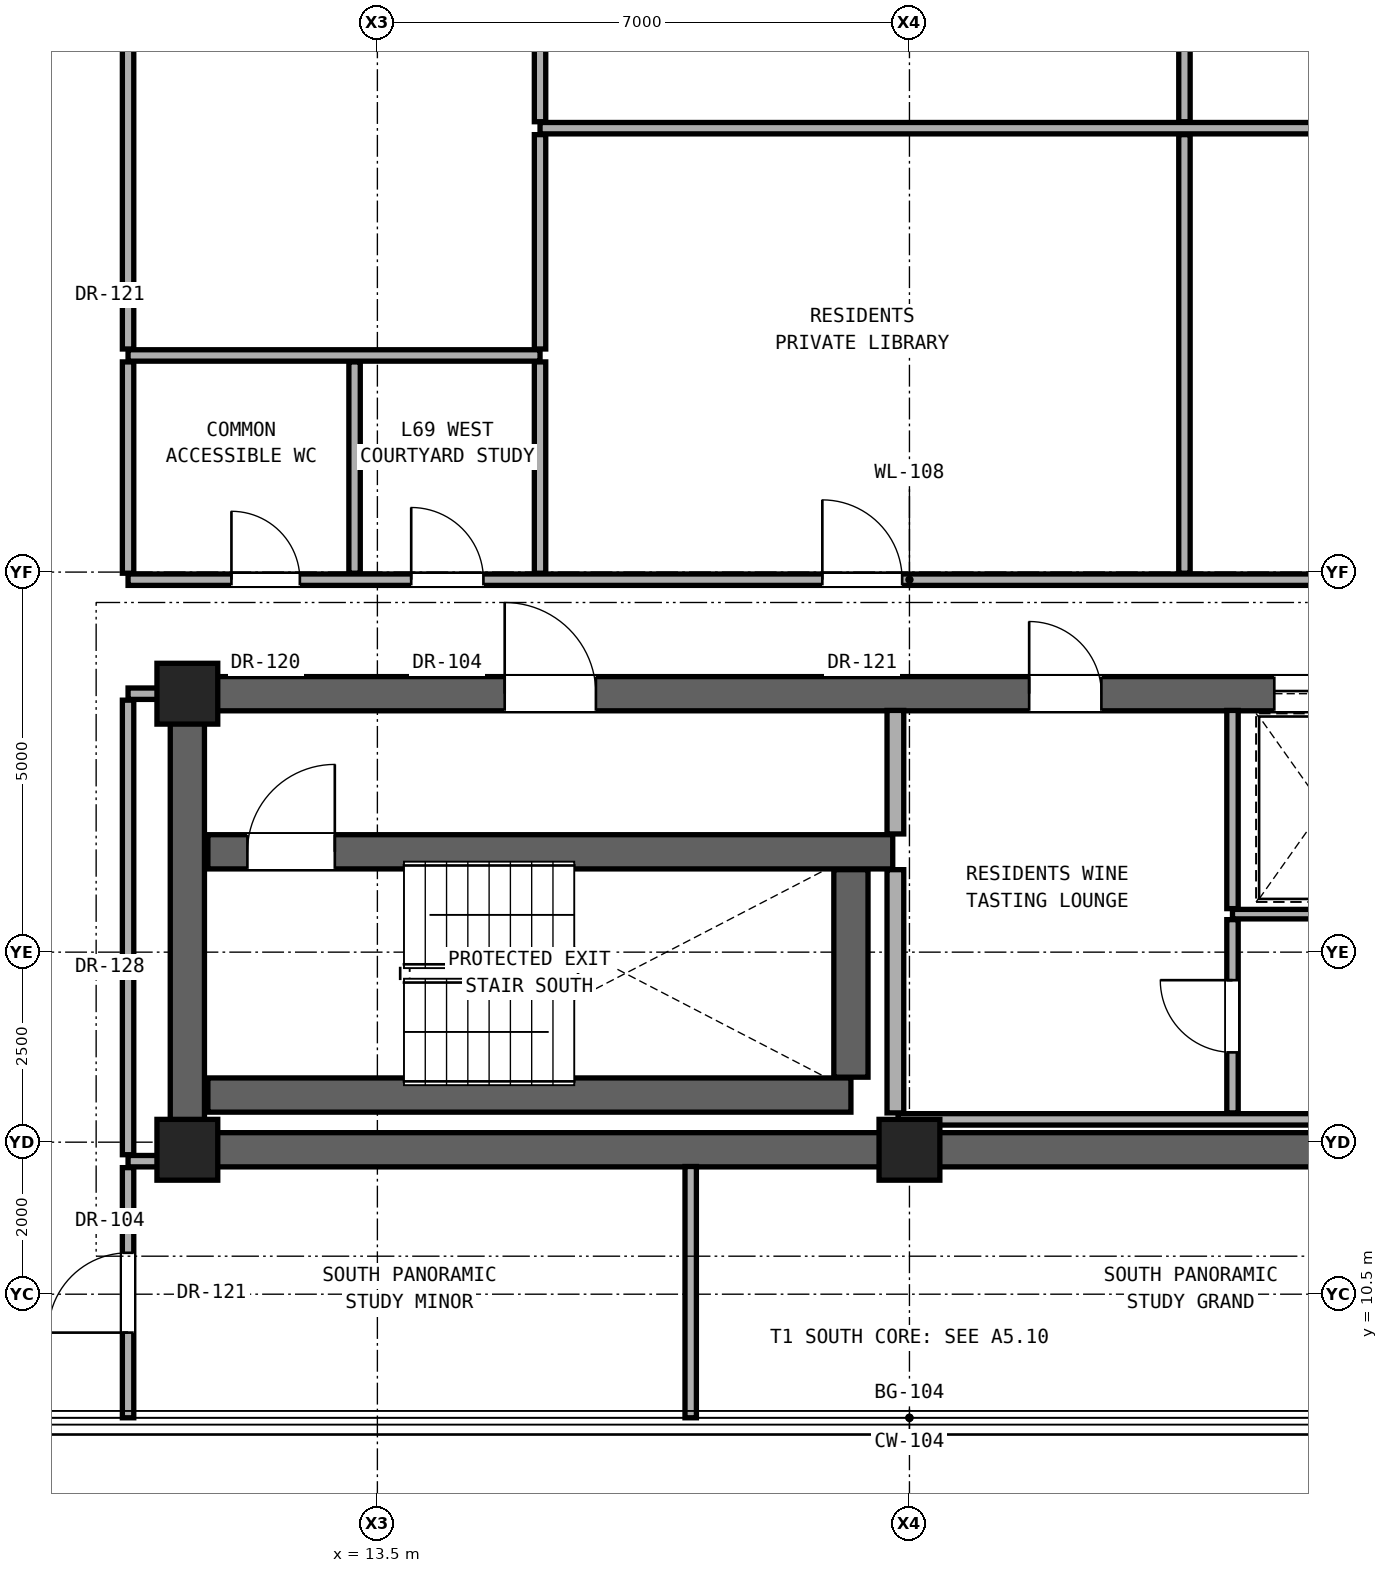
"""IFC4 building model, lengths in metres.
Left out: names, types, materials, properties, quantities, classifications, styles, units other than length and angle.
Written with IfcOpenShell. Run it as: python <this file> out.ifc"""

import sys

from ifc_helpers import new_model, si_unit, direction, frame, frame_2d, origin, origin_2d, place, context, subcontext, project, spatial, rectangle, extrude, element, fill, save


model = new_model("IFC4")
c1 = context("Model", 3, precision=1e-05, world=origin(), true_north=direction((0.0, 1.0)))
c2 = subcontext(c1, "Body", "Model", "MODEL_VIEW")
j1 = project(units=[si_unit("LENGTHUNIT", "METRE"), si_unit("PLANEANGLEUNIT", "RADIAN")], contexts=[c1])
p1 = place(None, origin())
s1 = spatial("IfcSite", under=j1, at=p1, CompositionType="ELEMENT")
p2 = place(p1, origin())
s2 = spatial("IfcBuilding", under=s1, at=p2, CompositionType="ELEMENT")
p3 = place(p2, frame((0.0, 0.0, 242.5)))
s3 = spatial("IfcBuildingStorey", under=s2, at=p3, CompositionType="ELEMENT", Elevation=242.5)
for number, where, z_axis, x_axis in (
    (1, (11.0, 12.4, 0.0), (0.0, 0.0, 1.0), (1.0, 0.0, 0.0)),
    (2, (20.5, 12.4, 0.0), (0.0, 0.0, 1.0), (1.0, 0.0, 0.0)),
    (3, (11.0, 18.4, 0.0), (0.0, 0.0, 1.0), (1.0, 0.0, 0.0)),
):
    element("IfcColumn", number, at=place(p3, frame(where, z_axis=z_axis, x_axis=x_axis)), inside=s3, PredefinedType="COLUMN", context=c2, shape_type="SweptSolid", body=[
        extrude(rectangle(XDim=0.8, YDim=0.8, at=origin_2d()), origin(), (0.0, 0.0, 1.0), 3.3),
    ])
p4 = place(p3, frame((11.0, 12.4, 0.0), z_axis=(0.0, 0.0, 1.0), x_axis=(1.0, 0.0, 0.0)))
e4 = element("IfcWall", 4, at=p4, inside=s3, PredefinedType="SHEAR", context=c2, shape_type="SweptSolid", body=[
    extrude(rectangle(XDim=19.0, YDim=0.45, at=frame_2d((9.5, 0.0))), origin(), (0.0, 0.0, 1.0), 3.1),
])
p5 = place(p3, frame((11.0, 12.4, 0.0), z_axis=(0.0, 0.0, 1.0), x_axis=(0.0, 1.0, 0.0)))
e5 = element("IfcWall", 5, at=p5, inside=s3, PredefinedType="SHEAR", context=c2, shape_type="SweptSolid", body=[
    extrude(rectangle(XDim=6.0, YDim=0.45, at=frame_2d((3.0, 0.0))), origin(), (0.0, 0.0, 1.0), 3.1),
])
p6 = place(p3, frame((11.0, 18.4, 0.0), z_axis=(0.0, 0.0, 1.0), x_axis=(1.0, 0.0, 0.0)))
e6 = element("IfcWall", 6, at=p6, inside=s3, PredefinedType="SHEAR", context=c2, shape_type="SweptSolid", body=[
    extrude(rectangle(XDim=19.0, YDim=0.45, at=frame_2d((9.5, 0.0))), origin(), (0.0, 0.0, 1.0), 3.1),
])
p7 = place(p6, frame((4.175, 0.0, 0.0)))
e7 = element("IfcOpeningElement", 7, at=p7, cuts=e6, PredefinedType="OPENING", context=c2, shape_type="SweptSolid", body=[
    extrude(rectangle(XDim=1.2, YDim=2.25, at=frame_2d((0.6, 1.125))), frame((0.0, 0.235, 0.0), z_axis=(0.0, -1.0, 0.0), x_axis=(1.0, 0.0, 0.0)), (0.0, 0.0, 1.0), 0.47),
])
p8 = place(p6, frame((11.075, 0.0, 0.0)))
e8 = element("IfcOpeningElement", 8, at=p8, cuts=e6, PredefinedType="OPENING", context=c2, shape_type="SweptSolid", body=[
    extrude(rectangle(XDim=0.95, YDim=2.15, at=frame_2d((0.475, 1.075))), frame((0.0, 0.235, 0.0), z_axis=(0.0, -1.0, 0.0), x_axis=(1.0, 0.0, 0.0)), (0.0, 0.0, 1.0), 0.47),
])
p9 = place(p6, frame((14.3, 0.0, 0.0)))
e9 = element("IfcOpeningElement", 9, at=p9, cuts=e6, PredefinedType="OPENING", context=c2, shape_type="SweptSolid", body=[
    extrude(rectangle(XDim=1.3, YDim=2.3, at=frame_2d((0.65, 1.15))), frame((0.0, 0.235, 0.0), z_axis=(0.0, -1.0, 0.0), x_axis=(1.0, 0.0, 0.0)), (0.0, 0.0, 1.0), 0.47),
])
p10 = place(p6, frame((16.6, 0.0, 0.0)))
e10 = element("IfcOpeningElement", 10, at=p10, cuts=e6, PredefinedType="OPENING", context=c2, shape_type="SweptSolid", body=[
    extrude(rectangle(XDim=1.3, YDim=2.3, at=frame_2d((0.65, 1.15))), frame((0.0, 0.235, 0.0), z_axis=(0.0, -1.0, 0.0), x_axis=(1.0, 0.0, 0.0)), (0.0, 0.0, 1.0), 0.47),
])
p11 = place(p3, frame((10.22, 12.25, 0.0), z_axis=(0.0, 0.0, 1.0), x_axis=(1.0, 0.0, 0.0)))
e11 = element("IfcWall", 11, at=p11, inside=s3, PredefinedType="PARTITIONING", context=c2, shape_type="SweptSolid", body=[
    extrude(rectangle(XDim=0.56, YDim=0.15, at=frame_2d((0.28, 0.0))), origin(), (0.0, 0.0, 1.0), 3.1),
])
p12 = place(p3, frame((20.35, 12.8, 0.0), z_axis=(0.0, 0.0, 1.0), x_axis=(1.0, 0.0, 0.0)))
e12 = element("IfcWall", 12, at=p12, inside=s3, PredefinedType="PARTITIONING", context=c2, shape_type="SweptSolid", body=[
    extrude(rectangle(XDim=8.9, YDim=0.15, at=frame_2d((4.45, 0.0))), origin(), (0.0, 0.0, 1.0), 3.1),
])
p13 = place(p3, frame((11.27, 13.12, 0.0), z_axis=(0.0, 0.0, 1.0), x_axis=(1.0, 0.0, 0.0)))
e13 = element("IfcWall", 13, at=p13, inside=s3, PredefinedType="SHEAR", context=c2, shape_type="SweptSolid", body=[
    extrude(rectangle(XDim=8.46, YDim=0.45, at=frame_2d((4.23, 0.0))), origin(), (0.0, 0.0, 1.0), 3.1),
])
p14 = place(p3, frame((24.75, 15.5, 0.0), z_axis=(0.0, 0.0, 1.0), x_axis=(1.0, 0.0, 0.0)))
e14 = element("IfcWall", 14, at=p14, inside=s3, PredefinedType="PARTITIONING", context=c2, shape_type="SweptSolid", body=[
    extrude(rectangle(XDim=4.5, YDim=0.125, at=frame_2d((2.25, 0.0))), origin(), (0.0, 0.0, 1.0), 3.1),
])
p15 = place(p3, frame((11.27, 16.32, 0.0), z_axis=(0.0, 0.0, 1.0), x_axis=(1.0, 0.0, 0.0)))
e15 = element("IfcWall", 15, at=p15, inside=s3, PredefinedType="SHEAR", context=c2, shape_type="SweptSolid", body=[
    extrude(rectangle(XDim=9.01, YDim=0.45, at=frame_2d((4.505, 0.0))), origin(), (0.0, 0.0, 1.0), 3.1),
])
p16 = place(p15, frame((0.52, 0.0, 0.0)))
e16 = element("IfcOpeningElement", 16, at=p16, cuts=e15, PredefinedType="OPENING", context=c2, shape_type="SweptSolid", body=[
    extrude(rectangle(XDim=1.15, YDim=2.2, at=frame_2d((0.575, 1.1))), frame((0.0, 0.235, 0.0), z_axis=(0.0, -1.0, 0.0), x_axis=(1.0, 0.0, 0.0)), (0.0, 0.0, 1.0), 0.47),
])
p17 = place(p3, frame((10.22, 18.4, 0.0), z_axis=(0.0, 0.0, 1.0), x_axis=(1.0, 0.0, 0.0)))
e17 = element("IfcWall", 17, at=p17, inside=s3, PredefinedType="PARTITIONING", context=c2, shape_type="SweptSolid", body=[
    extrude(rectangle(XDim=0.56, YDim=0.15, at=frame_2d((0.28, 0.0))), origin(), (0.0, 0.0, 1.0), 2.492),
])
p18 = place(p3, frame((10.22, 19.9, 0.0), z_axis=(0.0, 0.0, 1.0), x_axis=(1.0, 0.0, 0.0)))
e18 = element("IfcWall", 18, at=p18, inside=s3, PredefinedType="PARTITIONING", context=c2, shape_type="SweptSolid", body=[
    extrude(rectangle(XDim=20.56, YDim=0.15, at=frame_2d((10.28, 0.0))), origin(), (0.0, 0.0, 1.0), 2.236),
])
p19 = place(p18, frame((1.36, 0.0, 0.0)))
e19 = element("IfcOpeningElement", 19, at=p19, cuts=e18, PredefinedType="OPENING", context=c2, shape_type="SweptSolid", body=[
    extrude(rectangle(XDim=0.9, YDim=2.1, at=frame_2d((0.45, 1.05))), frame((0.0, 0.085, 0.0), z_axis=(0.0, -1.0, 0.0), x_axis=(1.0, 0.0, 0.0)), (0.0, 0.0, 1.0), 0.17),
])
p20 = place(p18, frame((3.725, 0.0, 0.0)))
e20 = element("IfcOpeningElement", 20, at=p20, cuts=e18, PredefinedType="OPENING", context=c2, shape_type="SweptSolid", body=[
    extrude(rectangle(XDim=0.95, YDim=2.15, at=frame_2d((0.475, 1.075))), frame((0.0, 0.085, 0.0), z_axis=(0.0, -1.0, 0.0), x_axis=(1.0, 0.0, 0.0)), (0.0, 0.0, 1.0), 0.17),
])
p21 = place(p18, frame((9.134, 0.0, 0.0)))
e21 = element("IfcOpeningElement", 21, at=p21, cuts=e18, PredefinedType="OPENING", context=c2, shape_type="SweptSolid", body=[
    extrude(rectangle(XDim=1.05, YDim=2.2, at=frame_2d((0.525, 1.1))), frame((0.0, 0.085, 0.0), z_axis=(0.0, -1.0, 0.0), x_axis=(1.0, 0.0, 0.0)), (0.0, 0.0, 1.0), 0.17),
])
p22 = place(p18, frame((16.684, 0.0, 0.0)))
e22 = element("IfcOpeningElement", 22, at=p22, cuts=e18, PredefinedType="OPENING", context=c2, shape_type="SweptSolid", body=[
    extrude(rectangle(XDim=1.05, YDim=2.2, at=frame_2d((0.525, 1.1))), frame((0.0, 0.085, 0.0), z_axis=(0.0, -1.0, 0.0), x_axis=(1.0, 0.0, 0.0)), (0.0, 0.0, 1.0), 0.17),
])
p23 = place(p3, frame((10.22, 22.85, 0.0), z_axis=(0.0, 0.0, 1.0), x_axis=(1.0, 0.0, 0.0)))
e23 = element("IfcWall", 23, at=p23, inside=s3, PredefinedType="PARTITIONING", context=c2, shape_type="SweptSolid", body=[
    extrude(rectangle(XDim=5.42, YDim=0.15, at=frame_2d((2.71, 0.0))), origin(), (0.0, 0.0, 1.0), 2.236),
])
p24 = place(p3, frame((15.64, 25.84, 0.0), z_axis=(0.0, 0.0, 1.0), x_axis=(1.0, 0.0, 0.0)))
e24 = element("IfcWall", 24, at=p24, inside=s3, PredefinedType="PARTITIONING", context=c2, shape_type="SweptSolid", body=[
    extrude(rectangle(XDim=15.14, YDim=0.15, at=frame_2d((7.57, 0.0))), origin(), (0.0, 0.0, 1.0), 2.236),
])
p25 = place(p3, frame((10.22, 8.874, 0.0), z_axis=(0.0, 0.0, 1.0), x_axis=(0.0, 1.0, 0.0)))
e25 = element("IfcWall", 25, at=p25, inside=s3, PredefinedType="PARTITIONING", context=c2, shape_type="SweptSolid", body=[
    extrude(rectangle(XDim=3.291, YDim=0.15, at=frame_2d((1.646, 0.0))), origin(), (0.0, 0.0, 1.0), 3.1),
])
p26 = place(p25, frame((1.121, 0.0, 0.0)))
e26 = element("IfcOpeningElement", 26, at=p26, cuts=e25, PredefinedType="OPENING", context=c2, shape_type="SweptSolid", body=[
    extrude(rectangle(XDim=1.05, YDim=2.2, at=frame_2d((0.525, 1.1))), frame((0.0, 0.085, 0.0), z_axis=(0.0, -1.0, 0.0), x_axis=(1.0, 0.0, 0.0)), (0.0, 0.0, 1.0), 0.17),
])
p27 = place(p3, frame((10.22, 12.335, 0.0), z_axis=(0.0, 0.0, 1.0), x_axis=(0.0, 1.0, 0.0)))
e27 = element("IfcWall", 27, at=p27, inside=s3, PredefinedType="PARTITIONING", context=c2, shape_type="SweptSolid", body=[
    extrude(rectangle(XDim=5.98, YDim=0.15, at=frame_2d((2.99, 0.0))), origin(), (0.0, 0.0, 1.0), 2.492),
])
p28 = place(p3, frame((10.22, 19.985, 0.0), z_axis=(0.0, 0.0, 1.0), x_axis=(0.0, 1.0, 0.0)))
e28 = element("IfcWall", 28, at=p28, inside=s3, PredefinedType="PARTITIONING", context=c2, shape_type="SweptSolid", body=[
    extrude(rectangle(XDim=2.78, YDim=0.15, at=frame_2d((1.39, 0.0))), origin(), (0.0, 0.0, 1.0), 3.1),
])
p29 = place(p3, frame((10.22, 22.935, 0.0), z_axis=(0.0, 0.0, 1.0), x_axis=(0.0, 1.0, 0.0)))
e29 = element("IfcWall", 29, at=p29, inside=s3, PredefinedType="PARTITIONING", context=c2, shape_type="SweptSolid", body=[
    extrude(rectangle(XDim=10.08, YDim=0.15, at=frame_2d((5.04, 0.0))), origin(), (0.0, 0.0, 1.0), 2.396),
])
p30 = place(p29, frame((4.565, 0.0, 0.0)))
e30 = element("IfcOpeningElement", 30, at=p30, cuts=e29, PredefinedType="OPENING", context=c2, shape_type="SweptSolid", body=[
    extrude(rectangle(XDim=0.95, YDim=2.15, at=frame_2d((0.475, 1.075))), frame((0.0, 0.085, 0.0), z_axis=(0.0, -1.0, 0.0), x_axis=(1.0, 0.0, 0.0)), (0.0, 0.0, 1.0), 0.17),
])
p31 = place(p3, frame((13.2, 19.985, 0.0), z_axis=(0.0, 0.0, 1.0), x_axis=(0.0, 1.0, 0.0)))
e31 = element("IfcWall", 31, at=p31, inside=s3, PredefinedType="PARTITIONING", context=c2, shape_type="SweptSolid", body=[
    extrude(rectangle(XDim=2.78, YDim=0.15, at=frame_2d((1.39, 0.0))), origin(), (0.0, 0.0, 1.0), 3.1),
])
p32 = place(p3, frame((15.64, 19.985, 0.0), z_axis=(0.0, 0.0, 1.0), x_axis=(0.0, 1.0, 0.0)))
e32 = element("IfcWall", 32, at=p32, inside=s3, PredefinedType="PARTITIONING", context=c2, shape_type="SweptSolid", body=[
    extrude(rectangle(XDim=2.78, YDim=0.15, at=frame_2d((1.39, 0.0))), origin(), (0.0, 0.0, 1.0), 2.675),
])
p33 = place(p3, frame((15.64, 22.935, 0.0), z_axis=(0.0, 0.0, 1.0), x_axis=(0.0, 1.0, 0.0)))
e33 = element("IfcWall", 33, at=p33, inside=s3, PredefinedType="PARTITIONING", context=c2, shape_type="SweptSolid", body=[
    extrude(rectangle(XDim=2.82, YDim=0.15, at=frame_2d((1.41, 0.0))), origin(), (0.0, 0.0, 1.0), 2.236),
])
p34 = place(p3, frame((15.64, 25.925, 0.0), z_axis=(0.0, 0.0, 1.0), x_axis=(0.0, 1.0, 0.0)))
e34 = element("IfcWall", 34, at=p34, inside=s3, PredefinedType="PARTITIONING", context=c2, shape_type="SweptSolid", body=[
    extrude(rectangle(XDim=7.09, YDim=0.15, at=frame_2d((3.545, 0.0))), origin(), (0.0, 0.0, 1.0), 2.236),
])
p35 = place(p3, frame((17.622, 8.874, 0.0), z_axis=(0.0, 0.0, 1.0), x_axis=(0.0, 1.0, 0.0)))
e35 = element("IfcWall", 35, at=p35, inside=s3, PredefinedType="PARTITIONING", context=c2, shape_type="SweptSolid", body=[
    extrude(rectangle(XDim=3.306, YDim=0.15, at=frame_2d((1.653, 0.0))), origin(), (0.0, 0.0, 1.0), 3.1),
])
p36 = place(p3, frame((19.73, 13.355, 0.0), z_axis=(0.0, 0.0, 1.0), x_axis=(0.0, 1.0, 0.0)))
e36 = element("IfcWall", 36, at=p36, inside=s3, PredefinedType="SHEAR", context=c2, shape_type="SweptSolid", body=[
    extrude(rectangle(XDim=2.73, YDim=0.45, at=frame_2d((1.365, 0.0))), origin(), (0.0, 0.0, 1.0), 3.1),
])
p37 = place(p3, frame((20.315, 12.885, 0.0), z_axis=(0.0, 0.0, 1.0), x_axis=(0.0, 1.0, 0.0)))
e37 = element("IfcWall", 37, at=p37, inside=s3, PredefinedType="SOLIDWALL", context=c2, shape_type="SweptSolid", body=[
    extrude(rectangle(XDim=3.2, YDim=0.22, at=frame_2d((1.6, 0.0))), origin(), (0.0, 0.0, 1.0), 3.1),
])
p38 = place(p3, frame((20.315, 16.555, 0.0), z_axis=(0.0, 0.0, 1.0), x_axis=(0.0, 1.0, 0.0)))
e38 = element("IfcWall", 38, at=p38, inside=s3, PredefinedType="SOLIDWALL", context=c2, shape_type="SweptSolid", body=[
    extrude(rectangle(XDim=1.625, YDim=0.22, at=frame_2d((0.812, 0.0))), origin(), (0.0, 0.0, 1.0), 3.1),
])
p39 = place(p3, frame((24.118, 19.985, 0.0), z_axis=(0.0, 0.0, 1.0), x_axis=(0.0, 1.0, 0.0)))
e39 = element("IfcWall", 39, at=p39, inside=s3, PredefinedType="PARTITIONING", context=c2, shape_type="SweptSolid", body=[
    extrude(rectangle(XDim=5.77, YDim=0.15, at=frame_2d((2.885, 0.0))), origin(), (0.0, 0.0, 1.0), 2.236),
])
p40 = place(p3, frame((24.118, 25.925, 0.0), z_axis=(0.0, 0.0, 1.0), x_axis=(0.0, 1.0, 0.0)))
e40 = element("IfcWall", 40, at=p40, inside=s3, PredefinedType="PARTITIONING", context=c2, shape_type="SweptSolid", body=[
    extrude(rectangle(XDim=7.09, YDim=0.15, at=frame_2d((3.545, 0.0))), origin(), (0.0, 0.0, 1.0), 2.236),
])
p41 = place(p3, frame((24.75, 12.885, 0.0), z_axis=(0.0, 0.0, 1.0), x_axis=(0.0, 1.0, 0.0)))
e41 = element("IfcWall", 41, at=p41, inside=s3, PredefinedType="PARTITIONING", context=c2, shape_type="SweptSolid", body=[
    extrude(rectangle(XDim=2.542, YDim=0.15, at=frame_2d((1.271, 0.0))), origin(), (0.0, 0.0, 1.0), 3.1),
])
p42 = place(p41, frame((0.796, 0.0, 0.0)))
e42 = element("IfcOpeningElement", 42, at=p42, cuts=e41, PredefinedType="OPENING", context=c2, shape_type="SweptSolid", body=[
    extrude(rectangle(XDim=0.95, YDim=2.15, at=frame_2d((0.475, 1.075))), frame((0.0, 0.085, 0.0), z_axis=(0.0, -1.0, 0.0), x_axis=(1.0, 0.0, 0.0)), (0.0, 0.0, 1.0), 0.17),
])
p43 = place(p3, frame((24.75, 15.573, 0.0), z_axis=(0.0, 0.0, 1.0), x_axis=(0.0, 1.0, 0.0)))
e43 = element("IfcWall", 43, at=p43, inside=s3, PredefinedType="PARTITIONING", context=c2, shape_type="SweptSolid", body=[
    extrude(rectangle(XDim=2.607, YDim=0.15, at=frame_2d((1.304, 0.0))), origin(), (0.0, 0.0, 1.0), 3.1),
])
p44 = place(p7, origin())
e44 = element("IfcDoor", 44, at=p44, inside=s3, OperationType="SINGLE_SWING_LEFT", PredefinedType="DOOR", context=c2, shape_type="SweptSolid", body=[
    extrude(rectangle(XDim=1.2, YDim=2.25, at=frame_2d((0.6, 1.125))), frame((0.0, 0.025, 0.0), z_axis=(0.0, -1.0, 0.0), x_axis=(1.0, 0.0, 0.0)), (0.0, 0.0, 1.0), 0.05),
])
fill(e7, e44)
p45 = place(p16, origin())
e45 = element("IfcDoor", 45, at=p45, inside=s3, OperationType="SINGLE_SWING_RIGHT", PredefinedType="DOOR", context=c2, shape_type="SweptSolid", body=[
    extrude(rectangle(XDim=1.15, YDim=2.2, at=frame_2d((0.575, 1.1))), frame((0.0, 0.025, 0.0), z_axis=(0.0, -1.0, 0.0), x_axis=(1.0, 0.0, 0.0)), (0.0, 0.0, 1.0), 0.05),
])
fill(e16, e45)
p46 = place(p8, origin())
e46 = element("IfcDoor", 46, at=p46, inside=s3, OperationType="SINGLE_SWING_LEFT", PredefinedType="DOOR", context=c2, shape_type="SweptSolid", body=[
    extrude(rectangle(XDim=0.95, YDim=2.15, at=frame_2d((0.475, 1.075))), frame((0.0, 0.025, 0.0), z_axis=(0.0, -1.0, 0.0), x_axis=(1.0, 0.0, 0.0)), (0.0, 0.0, 1.0), 0.05),
])
fill(e8, e46)
p47 = place(p42, origin())
e47 = element("IfcDoor", 47, at=p47, inside=s3, OperationType="SINGLE_SWING_RIGHT", PredefinedType="DOOR", context=c2, shape_type="SweptSolid", body=[
    extrude(rectangle(XDim=0.95, YDim=2.15, at=frame_2d((0.475, 1.075))), frame((0.0, 0.025, 0.0), z_axis=(0.0, -1.0, 0.0), x_axis=(1.0, 0.0, 0.0)), (0.0, 0.0, 1.0), 0.05),
])
fill(e42, e47)
p48 = place(p19, origin())
e48 = element("IfcDoor", 48, at=p48, inside=s3, OperationType="SINGLE_SWING_LEFT", PredefinedType="DOOR", context=c2, shape_type="SweptSolid", body=[
    extrude(rectangle(XDim=0.9, YDim=2.1, at=frame_2d((0.45, 1.05))), frame((0.0, 0.025, 0.0), z_axis=(0.0, -1.0, 0.0), x_axis=(1.0, 0.0, 0.0)), (0.0, 0.0, 1.0), 0.05),
])
fill(e19, e48)
p49 = place(p20, origin())
e49 = element("IfcDoor", 49, at=p49, inside=s3, OperationType="SINGLE_SWING_LEFT", PredefinedType="DOOR", context=c2, shape_type="SweptSolid", body=[
    extrude(rectangle(XDim=0.95, YDim=2.15, at=frame_2d((0.475, 1.075))), frame((0.0, 0.025, 0.0), z_axis=(0.0, -1.0, 0.0), x_axis=(1.0, 0.0, 0.0)), (0.0, 0.0, 1.0), 0.05),
])
fill(e20, e49)
p50 = place(p21, origin())
e50 = element("IfcDoor", 50, at=p50, inside=s3, OperationType="SINGLE_SWING_LEFT", PredefinedType="DOOR", context=c2, shape_type="SweptSolid", body=[
    extrude(rectangle(XDim=1.05, YDim=2.2, at=frame_2d((0.525, 1.1))), frame((0.0, 0.025, 0.0), z_axis=(0.0, -1.0, 0.0), x_axis=(1.0, 0.0, 0.0)), (0.0, 0.0, 1.0), 0.05),
])
fill(e21, e50)
p51 = place(p26, origin())
e51 = element("IfcDoor", 51, at=p51, inside=s3, OperationType="SINGLE_SWING_LEFT", PredefinedType="DOOR", context=c2, shape_type="SweptSolid", body=[
    extrude(rectangle(XDim=1.05, YDim=2.2, at=frame_2d((0.525, 1.1))), frame((0.0, 0.025, 0.0), z_axis=(0.0, -1.0, 0.0), x_axis=(1.0, 0.0, 0.0)), (0.0, 0.0, 1.0), 0.05),
])
fill(e26, e51)
p52 = place(p9, origin())
e52 = element("IfcDoor", 52, at=p52, inside=s3, OperationType="DOUBLE_DOOR_SLIDING", PredefinedType="DOOR", context=c2, shape_type="SweptSolid", body=[
    extrude(rectangle(XDim=1.3, YDim=2.3, at=frame_2d((0.65, 1.15))), frame((0.0, 0.025, 0.0), z_axis=(0.0, -1.0, 0.0), x_axis=(1.0, 0.0, 0.0)), (0.0, 0.0, 1.0), 0.05),
])
fill(e9, e52)
save(model, sys.argv[1])
